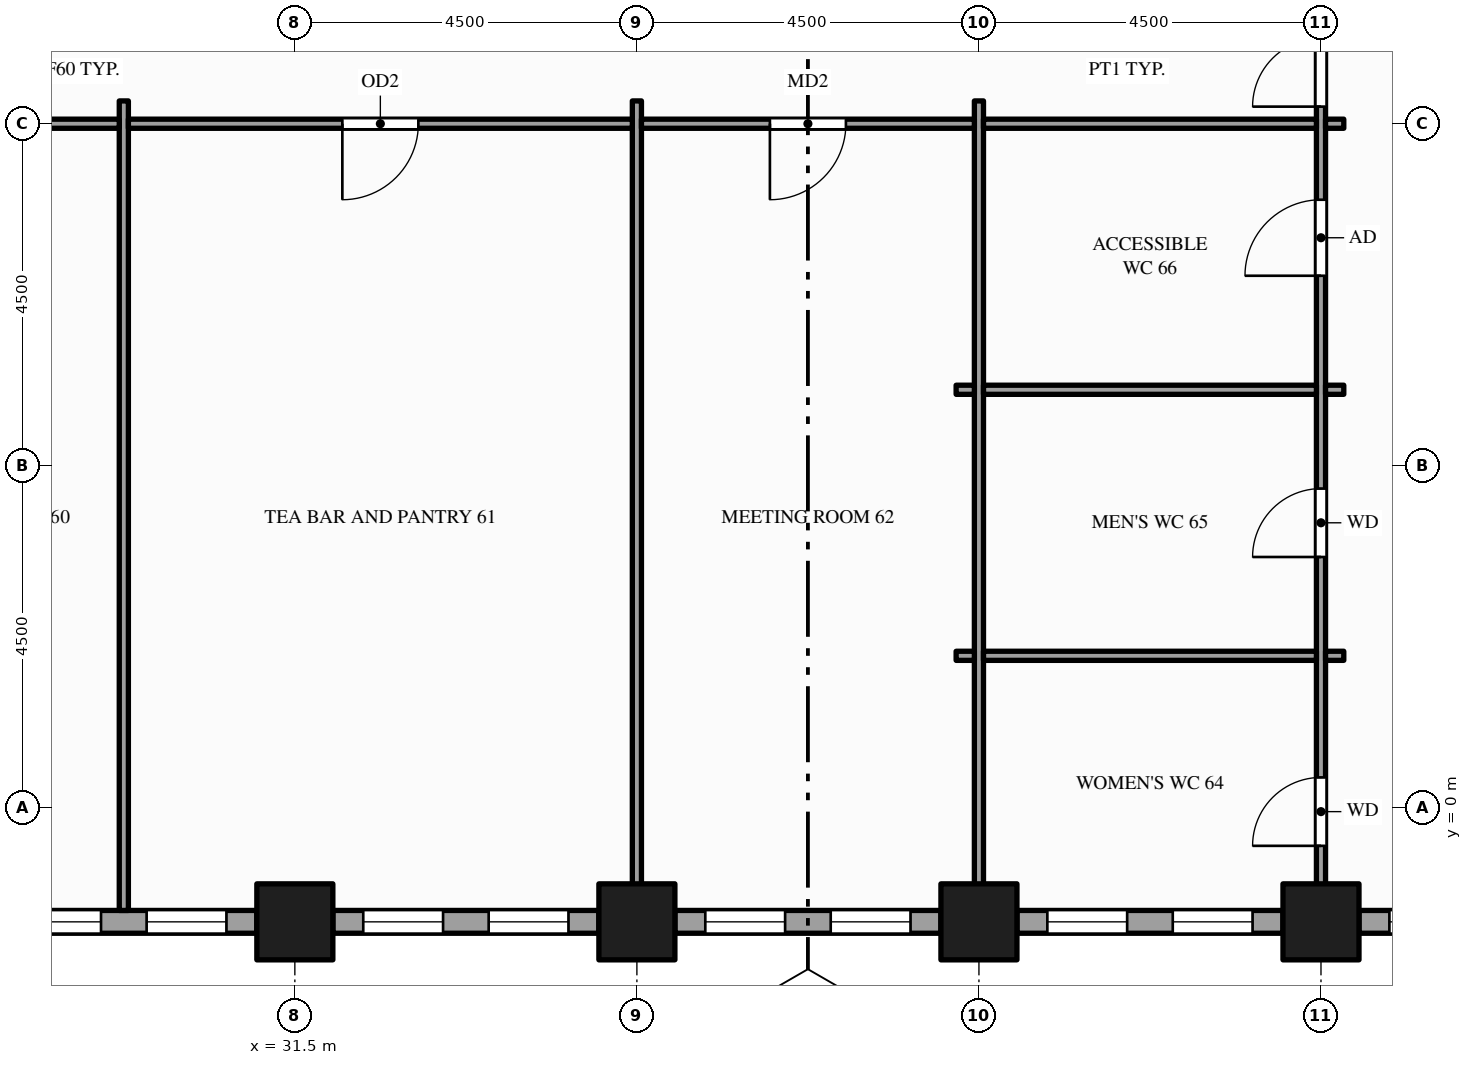
"""IFC4 building model, lengths in metres.
Left out: names, types, materials, properties, quantities, classifications, styles, units other than length and angle.
Written with IfcOpenShell. Run it as: python <this file> out.ifc"""

import sys

from ifc_helpers import new_model, si_unit, direction, frame, frame_2d, origin, origin_2d, place, context, subcontext, project, spatial, rectangle, hollow_rectangle, extrude, element, fill, save


model = new_model("IFC4")
c1 = context("Model", 3, precision=1e-05, world=origin(), true_north=direction((0.0, 1.0)))
c2 = subcontext(c1, "Body", "Model", "MODEL_VIEW")
j1 = project(units=[si_unit("LENGTHUNIT", "METRE"), si_unit("PLANEANGLEUNIT", "RADIAN")], contexts=[c1])
p1 = place(None, origin())
s1 = spatial("IfcSite", under=j1, at=p1, CompositionType="ELEMENT")
p2 = place(p1, origin())
s2 = spatial("IfcBuilding", under=s1, at=p2, CompositionType="ELEMENT")
p3 = place(p2, frame((0.0, 0.0, 119.0)))
s3 = spatial("IfcBuildingStorey", under=s2, at=p3, CompositionType="ELEMENT", Elevation=119.0)
for number, where, z_axis, x_axis in (
    (1, (31.5, -1.5, -0.15), (0.0, 0.0, 1.0), (1.0, 0.0, 0.0)),
    (2, (36.0, -1.5, -0.15), (0.0, 0.0, 1.0), (1.0, 0.0, 0.0)),
    (3, (40.5, -1.5, -0.15), (0.0, 0.0, 1.0), (1.0, 0.0, 0.0)),
    (4, (45.0, -1.5, -0.15), (0.0, 0.0, 1.0), (1.0, 0.0, 0.0)),
):
    element("IfcColumn", number, at=place(p3, frame(where, z_axis=z_axis, x_axis=x_axis)), inside=s3, PredefinedType="COLUMN", context=c2, shape_type="SweptSolid", body=[
        extrude(hollow_rectangle(XDim=1.0, YDim=1.0, WallThickness=0.05, at=origin_2d()), origin(), (0.0, 0.0, 1.0), 4.0),
    ])
p4 = place(p3, frame((27.5, -1.5, 0.0), z_axis=(0.0, 0.0, 1.0), x_axis=(1.0, 0.0, 0.0)))
e5 = element("IfcWall", 5, at=p4, inside=s3, PredefinedType="STANDARD", context=c2, shape_type="SweptSolid", body=[
    extrude(rectangle(XDim=3.5, YDim=0.3, at=frame_2d((1.75, 0.0))), origin(), (0.0, 0.0, 1.0), 3.154),
])
p5 = place(p4, frame((0.4, 0.0, 0.9)))
e6 = element("IfcOpeningElement", 6, at=p5, cuts=e5, PredefinedType="OPENING", context=c2, shape_type="SweptSolid", body=[
    extrude(rectangle(XDim=1.05, YDim=2.0, at=frame_2d((0.525, 1.0))), frame((0.0, 0.16, 0.0), z_axis=(0.0, -1.0, 0.0), x_axis=(1.0, 0.0, 0.0)), (0.0, 0.0, 1.0), 0.32),
])
p6 = place(p4, frame((2.05, 0.0, 0.9)))
e7 = element("IfcOpeningElement", 7, at=p6, cuts=e5, PredefinedType="OPENING", context=c2, shape_type="SweptSolid", body=[
    extrude(rectangle(XDim=1.05, YDim=2.0, at=frame_2d((0.525, 1.0))), frame((0.0, 0.16, 0.0), z_axis=(0.0, -1.0, 0.0), x_axis=(1.0, 0.0, 0.0)), (0.0, 0.0, 1.0), 0.32),
])
p7 = place(p3, frame((32.0, -1.5, 0.0), z_axis=(0.0, 0.0, 1.0), x_axis=(1.0, 0.0, 0.0)))
e8 = element("IfcWall", 8, at=p7, inside=s3, PredefinedType="STANDARD", context=c2, shape_type="SweptSolid", body=[
    extrude(rectangle(XDim=3.5, YDim=0.3, at=frame_2d((1.75, 0.0))), origin(), (0.0, 0.0, 1.0), 3.154),
])
p8 = place(p7, frame((0.4, 0.0, 0.9)))
e9 = element("IfcOpeningElement", 9, at=p8, cuts=e8, PredefinedType="OPENING", context=c2, shape_type="SweptSolid", body=[
    extrude(rectangle(XDim=1.05, YDim=2.0, at=frame_2d((0.525, 1.0))), frame((0.0, 0.16, 0.0), z_axis=(0.0, -1.0, 0.0), x_axis=(1.0, 0.0, 0.0)), (0.0, 0.0, 1.0), 0.32),
])
p9 = place(p7, frame((2.05, 0.0, 0.9)))
e10 = element("IfcOpeningElement", 10, at=p9, cuts=e8, PredefinedType="OPENING", context=c2, shape_type="SweptSolid", body=[
    extrude(rectangle(XDim=1.05, YDim=2.0, at=frame_2d((0.525, 1.0))), frame((0.0, 0.16, 0.0), z_axis=(0.0, -1.0, 0.0), x_axis=(1.0, 0.0, 0.0)), (0.0, 0.0, 1.0), 0.32),
])
p10 = place(p3, frame((36.5, -1.5, 0.0), z_axis=(0.0, 0.0, 1.0), x_axis=(1.0, 0.0, 0.0)))
e11 = element("IfcWall", 11, at=p10, inside=s3, PredefinedType="STANDARD", context=c2, shape_type="SweptSolid", body=[
    extrude(rectangle(XDim=3.5, YDim=0.3, at=frame_2d((1.75, 0.0))), origin(), (0.0, 0.0, 1.0), 3.154),
])
p11 = place(p10, frame((0.4, 0.0, 0.9)))
e12 = element("IfcOpeningElement", 12, at=p11, cuts=e11, PredefinedType="OPENING", context=c2, shape_type="SweptSolid", body=[
    extrude(rectangle(XDim=1.05, YDim=2.0, at=frame_2d((0.525, 1.0))), frame((0.0, 0.16, 0.0), z_axis=(0.0, -1.0, 0.0), x_axis=(1.0, 0.0, 0.0)), (0.0, 0.0, 1.0), 0.32),
])
p12 = place(p10, frame((2.05, 0.0, 0.9)))
e13 = element("IfcOpeningElement", 13, at=p12, cuts=e11, PredefinedType="OPENING", context=c2, shape_type="SweptSolid", body=[
    extrude(rectangle(XDim=1.05, YDim=2.0, at=frame_2d((0.525, 1.0))), frame((0.0, 0.16, 0.0), z_axis=(0.0, -1.0, 0.0), x_axis=(1.0, 0.0, 0.0)), (0.0, 0.0, 1.0), 0.32),
])
p13 = place(p3, frame((41.0, -1.5, 0.0), z_axis=(0.0, 0.0, 1.0), x_axis=(1.0, 0.0, 0.0)))
e14 = element("IfcWall", 14, at=p13, inside=s3, PredefinedType="STANDARD", context=c2, shape_type="SweptSolid", body=[
    extrude(rectangle(XDim=3.5, YDim=0.3, at=frame_2d((1.75, 0.0))), origin(), (0.0, 0.0, 1.0), 3.154),
])
p14 = place(p13, frame((0.4, 0.0, 0.9)))
e15 = element("IfcOpeningElement", 15, at=p14, cuts=e14, PredefinedType="OPENING", context=c2, shape_type="SweptSolid", body=[
    extrude(rectangle(XDim=1.05, YDim=2.0, at=frame_2d((0.525, 1.0))), frame((0.0, 0.16, 0.0), z_axis=(0.0, -1.0, 0.0), x_axis=(1.0, 0.0, 0.0)), (0.0, 0.0, 1.0), 0.32),
])
p15 = place(p13, frame((2.05, 0.0, 0.9)))
e16 = element("IfcOpeningElement", 16, at=p15, cuts=e14, PredefinedType="OPENING", context=c2, shape_type="SweptSolid", body=[
    extrude(rectangle(XDim=1.05, YDim=2.0, at=frame_2d((0.525, 1.0))), frame((0.0, 0.16, 0.0), z_axis=(0.0, -1.0, 0.0), x_axis=(1.0, 0.0, 0.0)), (0.0, 0.0, 1.0), 0.32),
])
p16 = place(p3, frame((45.5, -1.5, 0.0), z_axis=(0.0, 0.0, 1.0), x_axis=(1.0, 0.0, 0.0)))
e17 = element("IfcWall", 17, at=p16, inside=s3, PredefinedType="STANDARD", context=c2, shape_type="SweptSolid", body=[
    extrude(rectangle(XDim=3.5, YDim=0.3, at=frame_2d((1.75, 0.0))), origin(), (0.0, 0.0, 1.0), 3.154),
])
p17 = place(p16, frame((0.4, 0.0, 0.9)))
e18 = element("IfcOpeningElement", 18, at=p17, cuts=e17, PredefinedType="OPENING", context=c2, shape_type="SweptSolid", body=[
    extrude(rectangle(XDim=1.05, YDim=2.0, at=frame_2d((0.525, 1.0))), frame((0.0, 0.16, 0.0), z_axis=(0.0, -1.0, 0.0), x_axis=(1.0, 0.0, 0.0)), (0.0, 0.0, 1.0), 0.32),
])
p18 = place(p16, frame((2.05, 0.0, 0.9)))
e19 = element("IfcOpeningElement", 19, at=p18, cuts=e17, PredefinedType="OPENING", context=c2, shape_type="SweptSolid", body=[
    extrude(rectangle(XDim=1.05, YDim=2.0, at=frame_2d((0.525, 1.0))), frame((0.0, 0.16, 0.0), z_axis=(0.0, -1.0, 0.0), x_axis=(1.0, 0.0, 0.0)), (0.0, 0.0, 1.0), 0.32),
])
for number, where, z_axis, x_axis in (
    (20, (29.25, -1.35, 0.0), (0.0, 0.0, 1.0), (0.0, 1.0, 0.0)),
    (21, (36.0, -1.35, 0.0), (0.0, 0.0, 1.0), (0.0, 1.0, 0.0)),
    (22, (40.5, -1.35, 0.0), (0.0, 0.0, 1.0), (0.0, 1.0, 0.0)),
):
    element("IfcWall", number, at=place(p3, frame(where, z_axis=z_axis, x_axis=x_axis)), inside=s3, PredefinedType="PARTITIONING", context=c2, shape_type="SweptSolid", body=[
        extrude(rectangle(XDim=10.65, YDim=0.12, at=frame_2d((5.325, 0.0))), origin(), (0.0, 0.0, 1.0), 2.938),
    ])
p19 = place(p3, frame((45.0, -1.35, 0.0), z_axis=(0.0, 0.0, 1.0), x_axis=(0.0, 1.0, 0.0)))
e23 = element("IfcWall", 23, at=p19, inside=s3, PredefinedType="PARTITIONING", context=c2, shape_type="SweptSolid", body=[
    extrude(rectangle(XDim=22.2, YDim=0.12, at=frame_2d((11.1, 0.0))), origin(), (0.0, 0.0, 1.0), 2.938),
])
p20 = place(p19, frame((10.575, 0.0, 0.0)))
e24 = element("IfcOpeningElement", 24, at=p20, cuts=e23, PredefinedType="OPENING", context=c2, shape_type="SweptSolid", body=[
    extrude(rectangle(XDim=1.8, YDim=2.1, at=frame_2d((0.9, 1.05))), frame((0.0, 0.07, 0.0), z_axis=(0.0, -1.0, 0.0), x_axis=(1.0, 0.0, 0.0)), (0.0, 0.0, 1.0), 0.14),
])
p21 = place(p19, frame((0.85, 0.0, 0.0)))
e25 = element("IfcOpeningElement", 25, at=p21, cuts=e23, PredefinedType="OPENING", context=c2, shape_type="SweptSolid", body=[
    extrude(rectangle(XDim=0.9, YDim=2.1, at=frame_2d((0.45, 1.05))), frame((0.0, 0.07, 0.0), z_axis=(0.0, -1.0, 0.0), x_axis=(1.0, 0.0, 0.0)), (0.0, 0.0, 1.0), 0.14),
])
p22 = place(p19, frame((4.65, 0.0, 0.0)))
e26 = element("IfcOpeningElement", 26, at=p22, cuts=e23, PredefinedType="OPENING", context=c2, shape_type="SweptSolid", body=[
    extrude(rectangle(XDim=0.9, YDim=2.1, at=frame_2d((0.45, 1.05))), frame((0.0, 0.07, 0.0), z_axis=(0.0, -1.0, 0.0), x_axis=(1.0, 0.0, 0.0)), (0.0, 0.0, 1.0), 0.14),
])
p23 = place(p19, frame((8.35, 0.0, 0.0)))
e27 = element("IfcOpeningElement", 27, at=p23, cuts=e23, PredefinedType="OPENING", context=c2, shape_type="SweptSolid", body=[
    extrude(rectangle(XDim=1.0, YDim=2.1, at=frame_2d((0.5, 1.05))), frame((0.0, 0.07, 0.0), z_axis=(0.0, -1.0, 0.0), x_axis=(1.0, 0.0, 0.0)), (0.0, 0.0, 1.0), 0.14),
])
p24 = place(p3, frame((40.2, 2.0, 0.0), z_axis=(0.0, 0.0, 1.0), x_axis=(1.0, 0.0, 0.0)))
e28 = element("IfcWall", 28, at=p24, inside=s3, PredefinedType="PARTITIONING", context=c2, shape_type="SweptSolid", body=[
    extrude(rectangle(XDim=0.24, YDim=0.12, at=frame_2d((0.12, 0.0))), origin(), (0.0, 0.0, 1.0), 2.938),
])
p25 = place(p3, frame((40.56, 2.0, 0.0), z_axis=(0.0, 0.0, 1.0), x_axis=(1.0, 0.0, 0.0)))
e29 = element("IfcWall", 29, at=p25, inside=s3, PredefinedType="PARTITIONING", context=c2, shape_type="SweptSolid", body=[
    extrude(rectangle(XDim=4.38, YDim=0.12, at=frame_2d((2.19, 0.0))), origin(), (0.0, 0.0, 1.0), 2.938),
])
for number, where, z_axis, x_axis in (
    (30, (45.06, 2.0, 0.0), (0.0, 0.0, 1.0), (1.0, 0.0, 0.0)),
    (31, (40.2, 5.5, 0.0), (0.0, 0.0, 1.0), (1.0, 0.0, 0.0)),
):
    element("IfcWall", number, at=place(p3, frame(where, z_axis=z_axis, x_axis=x_axis)), inside=s3, PredefinedType="PARTITIONING", context=c2, shape_type="SweptSolid", body=[
        extrude(rectangle(XDim=0.24, YDim=0.12, at=frame_2d((0.12, 0.0))), origin(), (0.0, 0.0, 1.0), 2.938),
    ])
p26 = place(p3, frame((40.56, 5.5, 0.0), z_axis=(0.0, 0.0, 1.0), x_axis=(1.0, 0.0, 0.0)))
e32 = element("IfcWall", 32, at=p26, inside=s3, PredefinedType="PARTITIONING", context=c2, shape_type="SweptSolid", body=[
    extrude(rectangle(XDim=4.38, YDim=0.12, at=frame_2d((2.19, 0.0))), origin(), (0.0, 0.0, 1.0), 2.938),
])
p27 = place(p3, frame((45.06, 5.5, 0.0), z_axis=(0.0, 0.0, 1.0), x_axis=(1.0, 0.0, 0.0)))
e33 = element("IfcWall", 33, at=p27, inside=s3, PredefinedType="PARTITIONING", context=c2, shape_type="SweptSolid", body=[
    extrude(rectangle(XDim=0.24, YDim=0.12, at=frame_2d((0.12, 0.0))), origin(), (0.0, 0.0, 1.0), 2.938),
])
p28 = place(p3, frame((24.81, 9.0, 0.0), z_axis=(0.0, 0.0, 1.0), x_axis=(1.0, 0.0, 0.0)))
e34 = element("IfcWall", 34, at=p28, inside=s3, PredefinedType="PARTITIONING", context=c2, shape_type="SweptSolid", body=[
    extrude(rectangle(XDim=4.38, YDim=0.12, at=frame_2d((2.19, 0.0))), origin(), (0.0, 0.0, 1.0), 2.76),
])
p29 = place(p28, frame((1.74, 0.0, 0.0)))
e35 = element("IfcOpeningElement", 35, at=p29, cuts=e34, PredefinedType="OPENING", context=c2, shape_type="SweptSolid", body=[
    extrude(rectangle(XDim=0.9, YDim=2.1, at=frame_2d((0.45, 1.05))), frame((0.0, 0.07, 0.0), z_axis=(0.0, -1.0, 0.0), x_axis=(1.0, 0.0, 0.0)), (0.0, 0.0, 1.0), 0.14),
])
p30 = place(p3, frame((29.31, 9.0, 0.0), z_axis=(0.0, 0.0, 1.0), x_axis=(1.0, 0.0, 0.0)))
e36 = element("IfcWall", 36, at=p30, inside=s3, PredefinedType="PARTITIONING", context=c2, shape_type="SweptSolid", body=[
    extrude(rectangle(XDim=6.63, YDim=0.12, at=frame_2d((3.315, 0.0))), origin(), (0.0, 0.0, 1.0), 2.938),
])
p31 = place(p30, frame((2.815, 0.0, 0.0)))
e37 = element("IfcOpeningElement", 37, at=p31, cuts=e36, PredefinedType="OPENING", context=c2, shape_type="SweptSolid", body=[
    extrude(rectangle(XDim=1.0, YDim=2.1, at=frame_2d((0.5, 1.05))), frame((0.0, 0.07, 0.0), z_axis=(0.0, -1.0, 0.0), x_axis=(1.0, 0.0, 0.0)), (0.0, 0.0, 1.0), 0.14),
])
p32 = place(p3, frame((36.06, 9.0, 0.0), z_axis=(0.0, 0.0, 1.0), x_axis=(1.0, 0.0, 0.0)))
e38 = element("IfcWall", 38, at=p32, inside=s3, PredefinedType="PARTITIONING", context=c2, shape_type="SweptSolid", body=[
    extrude(rectangle(XDim=4.38, YDim=0.12, at=frame_2d((2.19, 0.0))), origin(), (0.0, 0.0, 1.0), 2.938),
])
p33 = place(p32, frame((1.69, 0.0, 0.0)))
e39 = element("IfcOpeningElement", 39, at=p33, cuts=e38, PredefinedType="OPENING", context=c2, shape_type="SweptSolid", body=[
    extrude(rectangle(XDim=1.0, YDim=2.1, at=frame_2d((0.5, 1.05))), frame((0.0, 0.07, 0.0), z_axis=(0.0, -1.0, 0.0), x_axis=(1.0, 0.0, 0.0)), (0.0, 0.0, 1.0), 0.14),
])
p34 = place(p3, frame((40.56, 9.0, 0.0), z_axis=(0.0, 0.0, 1.0), x_axis=(1.0, 0.0, 0.0)))
e40 = element("IfcWall", 40, at=p34, inside=s3, PredefinedType="PARTITIONING", context=c2, shape_type="SweptSolid", body=[
    extrude(rectangle(XDim=4.38, YDim=0.12, at=frame_2d((2.19, 0.0))), origin(), (0.0, 0.0, 1.0), 2.938),
])
p35 = place(p3, frame((45.06, 9.0, 0.0), z_axis=(0.0, 0.0, 1.0), x_axis=(1.0, 0.0, 0.0)))
e41 = element("IfcWall", 41, at=p35, inside=s3, PredefinedType="PARTITIONING", context=c2, shape_type="SweptSolid", body=[
    extrude(rectangle(XDim=0.24, YDim=0.12, at=frame_2d((0.12, 0.0))), origin(), (0.0, 0.0, 1.0), 2.938),
])
p36 = place(p5, origin())
e42 = element("IfcWindow", 42, at=p36, inside=s3, PartitioningType="SINGLE_PANEL", PredefinedType="WINDOW", context=c2, shape_type="SweptSolid", body=[
    extrude(rectangle(XDim=1.05, YDim=2.0, at=frame_2d((0.525, 1.0))), frame((0.0, 0.03, 0.0), z_axis=(0.0, -1.0, 0.0), x_axis=(1.0, 0.0, 0.0)), (0.0, 0.0, 1.0), 0.06),
])
fill(e6, e42)
p37 = place(p6, origin())
e43 = element("IfcWindow", 43, at=p37, inside=s3, PartitioningType="SINGLE_PANEL", PredefinedType="WINDOW", context=c2, shape_type="SweptSolid", body=[
    extrude(rectangle(XDim=1.05, YDim=2.0, at=frame_2d((0.525, 1.0))), frame((0.0, 0.03, 0.0), z_axis=(0.0, -1.0, 0.0), x_axis=(1.0, 0.0, 0.0)), (0.0, 0.0, 1.0), 0.06),
])
fill(e7, e43)
p38 = place(p8, origin())
e44 = element("IfcWindow", 44, at=p38, inside=s3, PartitioningType="SINGLE_PANEL", PredefinedType="WINDOW", context=c2, shape_type="SweptSolid", body=[
    extrude(rectangle(XDim=1.05, YDim=2.0, at=frame_2d((0.525, 1.0))), frame((0.0, 0.03, 0.0), z_axis=(0.0, -1.0, 0.0), x_axis=(1.0, 0.0, 0.0)), (0.0, 0.0, 1.0), 0.06),
])
fill(e9, e44)
p39 = place(p9, origin())
e45 = element("IfcWindow", 45, at=p39, inside=s3, PartitioningType="SINGLE_PANEL", PredefinedType="WINDOW", context=c2, shape_type="SweptSolid", body=[
    extrude(rectangle(XDim=1.05, YDim=2.0, at=frame_2d((0.525, 1.0))), frame((0.0, 0.03, 0.0), z_axis=(0.0, -1.0, 0.0), x_axis=(1.0, 0.0, 0.0)), (0.0, 0.0, 1.0), 0.06),
])
fill(e10, e45)
p40 = place(p11, origin())
e46 = element("IfcWindow", 46, at=p40, inside=s3, PartitioningType="SINGLE_PANEL", PredefinedType="WINDOW", context=c2, shape_type="SweptSolid", body=[
    extrude(rectangle(XDim=1.05, YDim=2.0, at=frame_2d((0.525, 1.0))), frame((0.0, 0.03, 0.0), z_axis=(0.0, -1.0, 0.0), x_axis=(1.0, 0.0, 0.0)), (0.0, 0.0, 1.0), 0.06),
])
fill(e12, e46)
p41 = place(p12, origin())
e47 = element("IfcWindow", 47, at=p41, inside=s3, PartitioningType="SINGLE_PANEL", PredefinedType="WINDOW", context=c2, shape_type="SweptSolid", body=[
    extrude(rectangle(XDim=1.05, YDim=2.0, at=frame_2d((0.525, 1.0))), frame((0.0, 0.03, 0.0), z_axis=(0.0, -1.0, 0.0), x_axis=(1.0, 0.0, 0.0)), (0.0, 0.0, 1.0), 0.06),
])
fill(e13, e47)
p42 = place(p14, origin())
e48 = element("IfcWindow", 48, at=p42, inside=s3, PartitioningType="SINGLE_PANEL", PredefinedType="WINDOW", context=c2, shape_type="SweptSolid", body=[
    extrude(rectangle(XDim=1.05, YDim=2.0, at=frame_2d((0.525, 1.0))), frame((0.0, 0.03, 0.0), z_axis=(0.0, -1.0, 0.0), x_axis=(1.0, 0.0, 0.0)), (0.0, 0.0, 1.0), 0.06),
])
fill(e15, e48)
p43 = place(p15, origin())
e49 = element("IfcWindow", 49, at=p43, inside=s3, PartitioningType="SINGLE_PANEL", PredefinedType="WINDOW", context=c2, shape_type="SweptSolid", body=[
    extrude(rectangle(XDim=1.05, YDim=2.0, at=frame_2d((0.525, 1.0))), frame((0.0, 0.03, 0.0), z_axis=(0.0, -1.0, 0.0), x_axis=(1.0, 0.0, 0.0)), (0.0, 0.0, 1.0), 0.06),
])
fill(e16, e49)
p44 = place(p17, origin())
e50 = element("IfcWindow", 50, at=p44, inside=s3, PartitioningType="SINGLE_PANEL", PredefinedType="WINDOW", context=c2, shape_type="SweptSolid", body=[
    extrude(rectangle(XDim=1.05, YDim=2.0, at=frame_2d((0.525, 1.0))), frame((0.0, 0.03, 0.0), z_axis=(0.0, -1.0, 0.0), x_axis=(1.0, 0.0, 0.0)), (0.0, 0.0, 1.0), 0.06),
])
fill(e18, e50)
p45 = place(p20, origin())
e51 = element("IfcDoor", 51, at=p45, inside=s3, OperationType="DOUBLE_DOOR_SINGLE_SWING", PredefinedType="DOOR", context=c2, shape_type="SweptSolid", body=[
    extrude(rectangle(XDim=1.8, YDim=2.1, at=frame_2d((0.9, 1.05))), frame((0.0, 0.025, 0.0), z_axis=(0.0, -1.0, 0.0), x_axis=(1.0, 0.0, 0.0)), (0.0, 0.0, 1.0), 0.05),
])
fill(e24, e51)
p46 = place(p31, origin())
e52 = element("IfcDoor", 52, at=p46, inside=s3, OperationType="SINGLE_SWING_LEFT", PredefinedType="DOOR", context=c2, shape_type="SweptSolid", body=[
    extrude(rectangle(XDim=1.0, YDim=2.1, at=frame_2d((0.5, 1.05))), frame((0.0, 0.025, 0.0), z_axis=(0.0, -1.0, 0.0), x_axis=(1.0, 0.0, 0.0)), (0.0, 0.0, 1.0), 0.05),
])
fill(e37, e52)
p47 = place(p33, origin())
e53 = element("IfcDoor", 53, at=p47, inside=s3, OperationType="SINGLE_SWING_LEFT", PredefinedType="DOOR", context=c2, shape_type="SweptSolid", body=[
    extrude(rectangle(XDim=1.0, YDim=2.1, at=frame_2d((0.5, 1.05))), frame((0.0, 0.025, 0.0), z_axis=(0.0, -1.0, 0.0), x_axis=(1.0, 0.0, 0.0)), (0.0, 0.0, 1.0), 0.05),
])
fill(e39, e53)
p48 = place(p21, origin())
e54 = element("IfcDoor", 54, at=p48, inside=s3, OperationType="SINGLE_SWING_LEFT", PredefinedType="DOOR", context=c2, shape_type="SweptSolid", body=[
    extrude(rectangle(XDim=0.9, YDim=2.1, at=frame_2d((0.45, 1.05))), frame((0.0, 0.025, 0.0), z_axis=(0.0, -1.0, 0.0), x_axis=(1.0, 0.0, 0.0)), (0.0, 0.0, 1.0), 0.05),
])
fill(e25, e54)
p49 = place(p22, origin())
e55 = element("IfcDoor", 55, at=p49, inside=s3, OperationType="SINGLE_SWING_LEFT", PredefinedType="DOOR", context=c2, shape_type="SweptSolid", body=[
    extrude(rectangle(XDim=0.9, YDim=2.1, at=frame_2d((0.45, 1.05))), frame((0.0, 0.025, 0.0), z_axis=(0.0, -1.0, 0.0), x_axis=(1.0, 0.0, 0.0)), (0.0, 0.0, 1.0), 0.05),
])
fill(e26, e55)
p50 = place(p23, origin())
e56 = element("IfcDoor", 56, at=p50, inside=s3, OperationType="SINGLE_SWING_LEFT", PredefinedType="DOOR", context=c2, shape_type="SweptSolid", body=[
    extrude(rectangle(XDim=1.0, YDim=2.1, at=frame_2d((0.5, 1.05))), frame((0.0, 0.025, 0.0), z_axis=(0.0, -1.0, 0.0), x_axis=(1.0, 0.0, 0.0)), (0.0, 0.0, 1.0), 0.05),
])
fill(e27, e56)
save(model, sys.argv[1])
